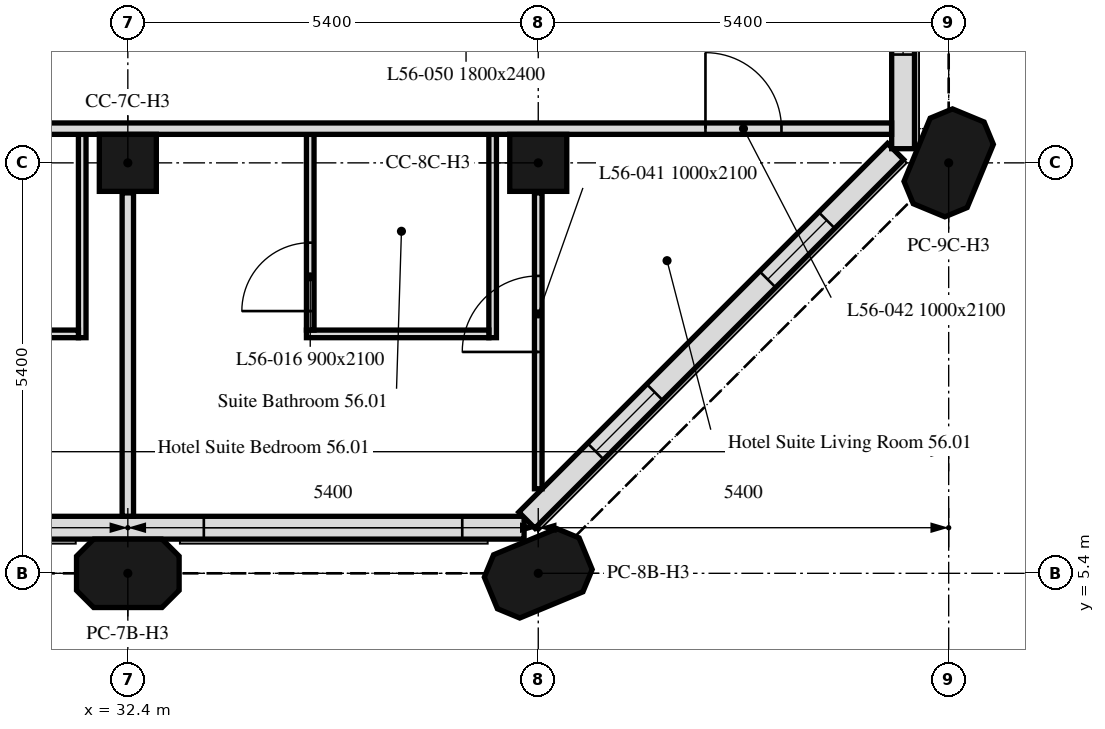
"""IFC4 building model, lengths in metres.
Left out: names, types, materials, properties, quantities, classifications, styles, units other than length and angle.
Written with IfcOpenShell. Run it as: python <this file> out.ifc"""

import sys

from ifc_helpers import new_model, si_unit, direction, frame, frame_2d, origin, origin_2d, place, context, subcontext, project, spatial, polyline, rectangle, outline, extrude, element, fill, save


model = new_model("IFC4")
c1 = context("Model", 3, precision=1e-05, world=origin(), true_north=direction((0.0, 1.0)))
c2 = subcontext(c1, "Body", "Model", "MODEL_VIEW")
j1 = project(units=[si_unit("LENGTHUNIT", "METRE"), si_unit("PLANEANGLEUNIT", "RADIAN")], contexts=[c1])
p1 = place(None, origin())
s1 = spatial("IfcSite", under=j1, at=p1, CompositionType="ELEMENT")
p2 = place(p1, origin())
s2 = spatial("IfcBuilding", under=s1, at=p2, CompositionType="ELEMENT")
p3 = place(p2, frame((0.0, 0.0, 223.6)))
s3 = spatial("IfcBuildingStorey", under=s2, at=p3, CompositionType="ELEMENT", Elevation=223.6)
for number, where, z_axis, x_axis in (
    (1, (32.4, 5.4, 0.0), (0.0, 0.0, 1.0), (1.0, 0.0, 0.0)),
    (2, (37.8, 5.4, 0.0), (0.0, 0.0, 1.0), (0.924, 0.383, 0.0)),
):
    element("IfcColumn", number, at=place(p3, frame(where, z_axis=z_axis, x_axis=x_axis)), inside=s3, PredefinedType="COLUMN", context=c2, shape_type="SweptSolid", body=[
        extrude(outline(polyline([(-0.45, -0.45), (0.45, -0.45), (0.675, -0.225), (0.675, 0.225), (0.45, 0.45), (-0.45, 0.45), (-0.675, 0.225), (-0.675, -0.225), (-0.45, -0.45)])), origin(), (0.0, 0.0, 1.0), 3.0),
    ])
for number, where, z_axis, x_axis in (
    (3, (32.4, 10.8, 0.0), (0.0, 0.0, 1.0), (1.0, 0.0, 0.0)),
    (4, (37.8, 10.8, 0.0), (0.0, 0.0, 1.0), (1.0, 0.0, 0.0)),
):
    element("IfcColumn", number, at=place(p3, frame(where, z_axis=z_axis, x_axis=x_axis)), inside=s3, PredefinedType="COLUMN", context=c2, shape_type="SweptSolid", body=[
        extrude(rectangle(XDim=0.75, YDim=0.75, at=origin_2d()), origin(), (0.0, 0.0, 1.0), 3.0),
    ])
p4 = place(p3, frame((43.2, 10.8, 0.0), z_axis=(0.0, 0.0, 1.0), x_axis=(0.382683432365, 0.923879532511, 0.0)))
e5 = element("IfcColumn", 5, at=p4, inside=s3, PredefinedType="COLUMN", context=c2, shape_type="SweptSolid", body=[
    extrude(outline(polyline([(-0.45, -0.45), (0.45, -0.45), (0.675, -0.225), (0.675, 0.225), (0.45, 0.45), (-0.45, 0.45), (-0.675, 0.225), (-0.675, -0.225), (-0.45, -0.45)])), origin(), (0.0, 0.0, 1.0), 3.0),
])
p5 = place(p3, frame((5.586, 6.0, 0.0), z_axis=(0.0, 0.0, 1.0), x_axis=(1.0, 0.0, 0.0)))
e6 = element("IfcWall", 6, at=p5, inside=s3, PredefinedType="SOLIDWALL", context=c2, shape_type="SweptSolid", body=[
    extrude(rectangle(XDim=32.027, YDim=0.3, at=frame_2d((16.014, 0.0))), origin(), (0.0, 0.0, 1.0), 3.0),
])
p6 = place(p5, frame((2.764, 0.0, 0.9)))
e7 = element("IfcOpeningElement", 7, at=p6, cuts=e6, PredefinedType="OPENING", context=c2, shape_type="SweptSolid", body=[
    extrude(rectangle(XDim=1.1, YDim=1.7, at=frame_2d((0.55, 0.85))), frame((0.0, 0.16, 0.0), z_axis=(0.0, -1.0, 0.0), x_axis=(1.0, 0.0, 0.0)), (0.0, 0.0, 1.0), 0.32),
])
p7 = place(p5, frame((6.214, 0.0, 0.9)))
e8 = element("IfcOpeningElement", 8, at=p7, cuts=e6, PredefinedType="OPENING", context=c2, shape_type="SweptSolid", body=[
    extrude(rectangle(XDim=3.4, YDim=1.7, at=frame_2d((1.7, 0.85))), frame((0.0, 0.16, 0.0), z_axis=(0.0, -1.0, 0.0), x_axis=(1.0, 0.0, 0.0)), (0.0, 0.0, 1.0), 0.32),
])
p8 = place(p5, frame((13.564, 0.0, 0.9)))
e9 = element("IfcOpeningElement", 9, at=p8, cuts=e6, PredefinedType="OPENING", context=c2, shape_type="SweptSolid", body=[
    extrude(rectangle(XDim=1.1, YDim=1.7, at=frame_2d((0.55, 0.85))), frame((0.0, 0.16, 0.0), z_axis=(0.0, -1.0, 0.0), x_axis=(1.0, 0.0, 0.0)), (0.0, 0.0, 1.0), 0.32),
])
p9 = place(p5, frame((17.014, 0.0, 0.9)))
e10 = element("IfcOpeningElement", 10, at=p9, cuts=e6, PredefinedType="OPENING", context=c2, shape_type="SweptSolid", body=[
    extrude(rectangle(XDim=3.4, YDim=1.7, at=frame_2d((1.7, 0.85))), frame((0.0, 0.16, 0.0), z_axis=(0.0, -1.0, 0.0), x_axis=(1.0, 0.0, 0.0)), (0.0, 0.0, 1.0), 0.32),
])
p10 = place(p5, frame((24.364, 0.0, 0.9)))
e11 = element("IfcOpeningElement", 11, at=p10, cuts=e6, PredefinedType="OPENING", context=c2, shape_type="SweptSolid", body=[
    extrude(rectangle(XDim=1.1, YDim=1.7, at=frame_2d((0.55, 0.85))), frame((0.0, 0.16, 0.0), z_axis=(0.0, -1.0, 0.0), x_axis=(1.0, 0.0, 0.0)), (0.0, 0.0, 1.0), 0.32),
])
p11 = place(p5, frame((27.814, 0.0, 0.9)))
e12 = element("IfcOpeningElement", 12, at=p11, cuts=e6, PredefinedType="OPENING", context=c2, shape_type="SweptSolid", body=[
    extrude(rectangle(XDim=3.4, YDim=1.7, at=frame_2d((1.7, 0.85))), frame((0.0, 0.16, 0.0), z_axis=(0.0, -1.0, 0.0), x_axis=(1.0, 0.0, 0.0)), (0.0, 0.0, 1.0), 0.32),
])
p12 = place(p3, frame((37.65, 6.099, 0.0), z_axis=(0.0, 0.0, 1.0), x_axis=(0.707106781187, 0.707106781187, 0.0)))
e13 = element("IfcWall", 13, at=p12, inside=s3, PredefinedType="SOLIDWALL", context=c2, shape_type="SweptSolid", body=[
    extrude(rectangle(XDim=6.86, YDim=0.3, at=frame_2d((3.43, 0.0))), origin(), (0.0, 0.0, 1.0), 3.0),
])
p13 = place(p12, frame((1.28, 0.0, 0.9)))
e14 = element("IfcOpeningElement", 14, at=p13, cuts=e13, PredefinedType="OPENING", context=c2, shape_type="SweptSolid", body=[
    extrude(rectangle(XDim=1.1, YDim=1.7, at=frame_2d((0.55, 0.85))), frame((0.0, 0.16, 0.0), z_axis=(0.0, -1.0, 0.0), x_axis=(1.0, 0.0, 0.0)), (0.0, 0.0, 1.0), 0.32),
])
p14 = place(p12, frame((4.48, 0.0, 0.9)))
e15 = element("IfcOpeningElement", 15, at=p14, cuts=e13, PredefinedType="OPENING", context=c2, shape_type="SweptSolid", body=[
    extrude(rectangle(XDim=1.1, YDim=1.7, at=frame_2d((0.55, 0.85))), frame((0.0, 0.16, 0.0), z_axis=(0.0, -1.0, 0.0), x_axis=(1.0, 0.0, 0.0)), (0.0, 0.0, 1.0), 0.32),
])
p15 = place(p3, frame((42.6, 10.986, 0.0), z_axis=(0.0, 0.0, 1.0), x_axis=(0.0, 1.0, 0.0)))
e16 = element("IfcWall", 16, at=p15, inside=s3, PredefinedType="SOLIDWALL", context=c2, shape_type="SweptSolid", body=[
    extrude(rectangle(XDim=5.214, YDim=0.3, at=frame_2d((2.607, 0.0))), origin(), (0.0, 0.0, 1.0), 3.0),
])
p16 = place(p15, frame((1.239, 0.0, 0.9)))
e17 = element("IfcOpeningElement", 17, at=p16, cuts=e16, PredefinedType="OPENING", context=c2, shape_type="SweptSolid", body=[
    extrude(rectangle(XDim=0.65, YDim=1.7, at=frame_2d((0.325, 0.85))), frame((0.0, 0.16, 0.0), z_axis=(0.0, -1.0, 0.0), x_axis=(1.0, 0.0, 0.0)), (0.0, 0.0, 1.0), 0.32),
])
p17 = place(p15, frame((2.764, 0.0, 0.9)))
e18 = element("IfcOpeningElement", 18, at=p17, cuts=e16, PredefinedType="OPENING", context=c2, shape_type="SweptSolid", body=[
    extrude(rectangle(XDim=1.1, YDim=1.7, at=frame_2d((0.55, 0.85))), frame((0.0, 0.16, 0.0), z_axis=(0.0, -1.0, 0.0), x_axis=(1.0, 0.0, 0.0)), (0.0, 0.0, 1.0), 0.32),
])
p18 = place(p3, frame((37.8, 6.512, 0.0), z_axis=(0.0, 0.0, 1.0), x_axis=(0.0, 1.0, 0.0)))
e19 = element("IfcWall", 19, at=p18, inside=s3, PredefinedType="PARTITIONING", context=c2, shape_type="SweptSolid", body=[
    extrude(rectangle(XDim=3.893, YDim=0.1, at=frame_2d((1.946, 0.0))), origin(), (0.0, 0.0, 1.0), 3.0),
])
p19 = place(p18, frame((1.8, 0.0, 0.0)))
e20 = element("IfcOpeningElement", 20, at=p19, cuts=e19, PredefinedType="OPENING", context=c2, shape_type="SweptSolid", body=[
    extrude(rectangle(XDim=1.0, YDim=2.1, at=frame_2d((0.5, 1.05))), frame((0.0, 0.05, 0.0), z_axis=(0.0, -1.0, 0.0), x_axis=(1.0, 0.0, 0.0)), (0.0, 0.0, 1.0), 0.1),
])
p20 = place(p3, frame((37.2, 11.175, 0.0), z_axis=(0.0, 0.0, 1.0), x_axis=(0.0, -1.0, 0.0)))
e21 = element("IfcWall", 21, at=p20, inside=s3, PredefinedType="PARTITIONING", context=c2, shape_type="SweptSolid", body=[
    extrude(rectangle(XDim=2.675, YDim=0.1, at=frame_2d((1.337, 0.0))), origin(), (0.0, 0.0, 1.0), 3.0),
])
p21 = place(p3, frame((37.15, 8.55, 0.0), z_axis=(0.0, 0.0, 1.0), x_axis=(-1.0, 0.0, 0.0)))
e22 = element("IfcWall", 22, at=p21, inside=s3, PredefinedType="PARTITIONING", context=c2, shape_type="SweptSolid", body=[
    extrude(rectangle(XDim=2.4, YDim=0.1, at=frame_2d((1.2, 0.0))), origin(), (0.0, 0.0, 1.0), 3.0),
])
p22 = place(p3, frame((34.8, 8.6, 0.0), z_axis=(0.0, 0.0, 1.0), x_axis=(0.0, 1.0, 0.0)))
e23 = element("IfcWall", 23, at=p22, inside=s3, PredefinedType="PARTITIONING", context=c2, shape_type="SweptSolid", body=[
    extrude(rectangle(XDim=2.575, YDim=0.1, at=frame_2d((1.288, 0.0))), origin(), (0.0, 0.0, 1.0), 3.0),
])
p23 = place(p22, frame((0.25, 0.0, 0.0)))
e24 = element("IfcOpeningElement", 24, at=p23, cuts=e23, PredefinedType="OPENING", context=c2, shape_type="SweptSolid", body=[
    extrude(rectangle(XDim=0.9, YDim=2.1, at=frame_2d((0.45, 1.05))), frame((0.0, 0.05, 0.0), z_axis=(0.0, -1.0, 0.0), x_axis=(1.0, 0.0, 0.0)), (0.0, 0.0, 1.0), 0.1),
])
p24 = place(p3, frame((32.4, 10.405, 0.0), z_axis=(0.0, 0.0, 1.0), x_axis=(0.0, -1.0, 0.0)))
e25 = element("IfcWall", 25, at=p24, inside=s3, PredefinedType="PARTITIONING", context=c2, shape_type="SweptSolid", body=[
    extrude(rectangle(XDim=4.254, YDim=0.15, at=frame_2d((2.127, 0.0))), origin(), (0.0, 0.0, 1.0), 3.0),
])
p25 = place(p3, frame((31.8, 11.175, 0.0), z_axis=(0.0, 0.0, 1.0), x_axis=(0.0, -1.0, 0.0)))
e26 = element("IfcWall", 26, at=p25, inside=s3, PredefinedType="PARTITIONING", context=c2, shape_type="SweptSolid", body=[
    extrude(rectangle(XDim=2.675, YDim=0.1, at=frame_2d((1.337, 0.0))), origin(), (0.0, 0.0, 1.0), 3.0),
])
p26 = place(p3, frame((31.75, 8.55, 0.0), z_axis=(0.0, 0.0, 1.0), x_axis=(-1.0, 0.0, 0.0)))
e27 = element("IfcWall", 27, at=p26, inside=s3, PredefinedType="PARTITIONING", context=c2, shape_type="SweptSolid", body=[
    extrude(rectangle(XDim=2.1, YDim=0.1, at=frame_2d((1.05, 0.0))), origin(), (0.0, 0.0, 1.0), 3.0),
])
p27 = place(p3, frame((0.751, 11.25, 0.0), z_axis=(0.0, 0.0, 1.0), x_axis=(1.0, 0.0, 0.0)))
e28 = element("IfcWall", 28, at=p27, inside=s3, PredefinedType="PARTITIONING", context=c2, shape_type="SweptSolid", body=[
    extrude(rectangle(XDim=41.698, YDim=0.15, at=frame_2d((20.849, 0.0))), origin(), (0.0, 0.0, 1.0), 3.0),
])
p28 = place(p27, frame((39.249, 0.0, 0.0)))
e29 = element("IfcOpeningElement", 29, at=p28, cuts=e28, PredefinedType="OPENING", context=c2, shape_type="SweptSolid", body=[
    extrude(rectangle(XDim=1.0, YDim=2.1, at=frame_2d((0.5, 1.05))), frame((0.0, 0.075, 0.0), z_axis=(0.0, -1.0, 0.0), x_axis=(1.0, 0.0, 0.0)), (0.0, 0.0, 1.0), 0.15),
])
p29 = place(p27, frame((27.649, 0.0, 0.0)))
e30 = element("IfcOpeningElement", 30, at=p29, cuts=e28, PredefinedType="OPENING", context=c2, shape_type="SweptSolid", body=[
    extrude(rectangle(XDim=1.0, YDim=2.1, at=frame_2d((0.5, 1.05))), frame((0.0, 0.075, 0.0), z_axis=(0.0, -1.0, 0.0), x_axis=(1.0, 0.0, 0.0)), (0.0, 0.0, 1.0), 0.15),
])
p30 = place(p27, frame((23.049, 0.0, 0.0)))
e31 = element("IfcOpeningElement", 31, at=p30, cuts=e28, PredefinedType="OPENING", context=c2, shape_type="SweptSolid", body=[
    extrude(rectangle(XDim=1.0, YDim=2.1, at=frame_2d((0.5, 1.05))), frame((0.0, 0.075, 0.0), z_axis=(0.0, -1.0, 0.0), x_axis=(1.0, 0.0, 0.0)), (0.0, 0.0, 1.0), 0.15),
])
p31 = place(p27, frame((11.449, 0.0, 0.0)))
e32 = element("IfcOpeningElement", 32, at=p31, cuts=e28, PredefinedType="OPENING", context=c2, shape_type="SweptSolid", body=[
    extrude(rectangle(XDim=1.0, YDim=2.1, at=frame_2d((0.5, 1.05))), frame((0.0, 0.075, 0.0), z_axis=(0.0, -1.0, 0.0), x_axis=(1.0, 0.0, 0.0)), (0.0, 0.0, 1.0), 0.15),
])
p32 = place(p27, frame((2.744, 0.0, 0.0)))
e33 = element("IfcOpeningElement", 33, at=p32, cuts=e28, PredefinedType="OPENING", context=c2, shape_type="SweptSolid", body=[
    extrude(rectangle(XDim=1.0, YDim=2.1, at=frame_2d((0.5, 1.05))), frame((0.0, 0.075, 0.0), z_axis=(0.0, -1.0, 0.0), x_axis=(1.0, 0.0, 0.0)), (0.0, 0.0, 1.0), 0.15),
])
p33 = place(p11, origin())
e34 = element("IfcWindow", 34, at=p33, inside=s3, PartitioningType="SINGLE_PANEL", PredefinedType="WINDOW", context=c2, shape_type="SweptSolid", body=[
    extrude(rectangle(XDim=3.4, YDim=1.7, at=frame_2d((1.7, 0.85))), frame((0.0, 0.03, 0.0), z_axis=(0.0, -1.0, 0.0), x_axis=(1.0, 0.0, 0.0)), (0.0, 0.0, 1.0), 0.06),
])
fill(e12, e34)
p34 = place(p13, origin())
e35 = element("IfcWindow", 35, at=p34, inside=s3, PartitioningType="SINGLE_PANEL", PredefinedType="WINDOW", context=c2, shape_type="SweptSolid", body=[
    extrude(rectangle(XDim=1.1, YDim=1.7, at=frame_2d((0.55, 0.85))), frame((0.0, 0.03, 0.0), z_axis=(0.0, -1.0, 0.0), x_axis=(1.0, 0.0, 0.0)), (0.0, 0.0, 1.0), 0.06),
])
fill(e14, e35)
p35 = place(p14, origin())
e36 = element("IfcWindow", 36, at=p35, inside=s3, PartitioningType="SINGLE_PANEL", PredefinedType="WINDOW", context=c2, shape_type="SweptSolid", body=[
    extrude(rectangle(XDim=1.1, YDim=1.7, at=frame_2d((0.55, 0.85))), frame((0.0, 0.03, 0.0), z_axis=(0.0, -1.0, 0.0), x_axis=(1.0, 0.0, 0.0)), (0.0, 0.0, 1.0), 0.06),
])
fill(e15, e36)
p36 = place(p16, origin())
e37 = element("IfcWindow", 37, at=p36, inside=s3, PartitioningType="SINGLE_PANEL", PredefinedType="WINDOW", context=c2, shape_type="SweptSolid", body=[
    extrude(rectangle(XDim=0.65, YDim=1.7, at=frame_2d((0.325, 0.85))), frame((0.0, 0.03, 0.0), z_axis=(0.0, -1.0, 0.0), x_axis=(1.0, 0.0, 0.0)), (0.0, 0.0, 1.0), 0.06),
])
fill(e17, e37)
p37 = place(p23, origin())
e38 = element("IfcDoor", 38, at=p37, inside=s3, OperationType="SINGLE_SWING_RIGHT", PredefinedType="DOOR", context=c2, shape_type="SweptSolid", body=[
    extrude(rectangle(XDim=0.9, YDim=2.1, at=frame_2d((0.45, 1.05))), frame((0.0, 0.025, 0.0), z_axis=(0.0, -1.0, 0.0), x_axis=(1.0, 0.0, 0.0)), (0.0, 0.0, 1.0), 0.05),
])
fill(e24, e38)
p38 = place(p19, origin())
e39 = element("IfcDoor", 39, at=p38, inside=s3, OperationType="SINGLE_SWING_RIGHT", PredefinedType="DOOR", context=c2, shape_type="SweptSolid", body=[
    extrude(rectangle(XDim=1.0, YDim=2.1, at=frame_2d((0.5, 1.05))), frame((0.0, 0.025, 0.0), z_axis=(0.0, -1.0, 0.0), x_axis=(1.0, 0.0, 0.0)), (0.0, 0.0, 1.0), 0.05),
])
fill(e20, e39)
p39 = place(p28, origin())
e40 = element("IfcDoor", 40, at=p39, inside=s3, OperationType="SINGLE_SWING_LEFT", PredefinedType="DOOR", context=c2, shape_type="SweptSolid", body=[
    extrude(rectangle(XDim=1.0, YDim=2.1, at=frame_2d((0.5, 1.05))), frame((0.0, 0.025, 0.0), z_axis=(0.0, -1.0, 0.0), x_axis=(1.0, 0.0, 0.0)), (0.0, 0.0, 1.0), 0.05),
])
fill(e29, e40)
save(model, sys.argv[1])
